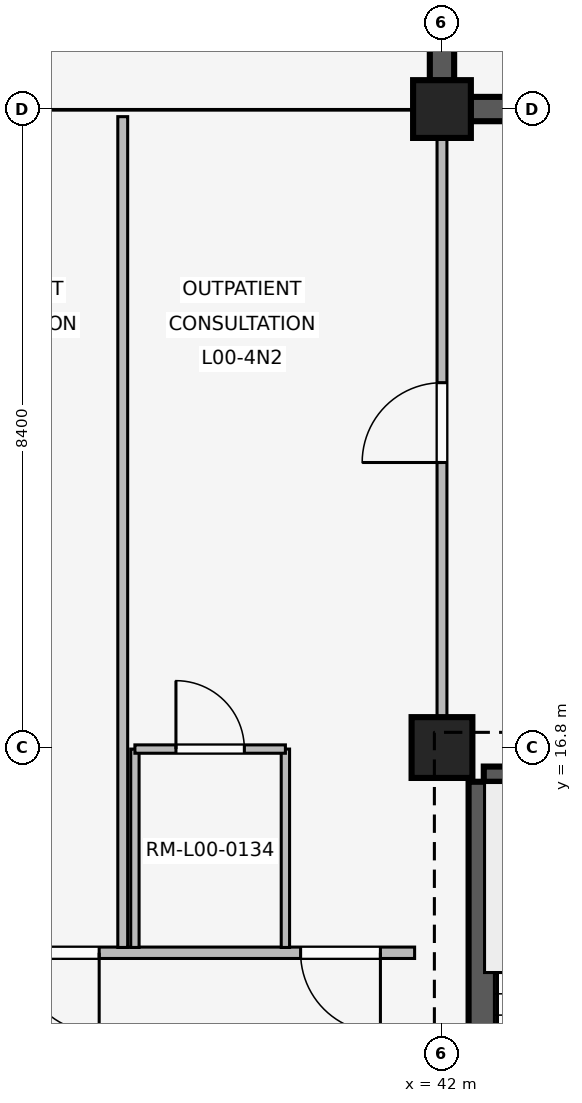
"""IFC4 building model, lengths in metres.
Left out: names, types, materials, properties, quantities, classifications, styles, units other than length and angle.
Written with IfcOpenShell. Run it as: python <this file> out.ifc"""

import sys

from ifc_helpers import new_model, si_unit, direction, frame, frame_2d, origin, origin_2d, place, context, subcontext, project, spatial, rectangle, extrude, element, fill, save


model = new_model("IFC4")
c1 = context("Model", 3, precision=1e-05, world=origin(), true_north=direction((0.0, 1.0)))
c2 = subcontext(c1, "Body", "Model", "MODEL_VIEW")
j1 = project(units=[si_unit("LENGTHUNIT", "METRE"), si_unit("PLANEANGLEUNIT", "RADIAN")], contexts=[c1])
p1 = place(None, origin())
s1 = spatial("IfcSite", under=j1, at=p1, CompositionType="ELEMENT")
p2 = place(p1, origin())
s2 = spatial("IfcBuilding", under=s1, at=p2, CompositionType="ELEMENT")
p3 = place(p2, origin())
s3 = spatial("IfcBuildingStorey", under=s2, at=p3, CompositionType="ELEMENT", Elevation=0.0)
p4 = place(p3, frame((42.0, 16.8, 0.0), z_axis=(0.0, 0.0, 1.0), x_axis=(1.0, 0.0, 0.0)))
e1 = element("IfcColumn", 1, at=p4, inside=s3, PredefinedType="COLUMN", context=c2, shape_type="SweptSolid", body=[
    extrude(rectangle(XDim=0.8, YDim=0.8, at=origin_2d()), origin(), (0.0, 0.0, 1.0), 4.8),
])
p5 = place(p3, frame((42.0, 25.2, 0.0), z_axis=(0.0, 0.0, 1.0), x_axis=(1.0, 0.0, 0.0)))
e2 = element("IfcColumn", 2, at=p5, inside=s3, PredefinedType="COLUMN", context=c2, shape_type="SweptSolid", body=[
    extrude(rectangle(XDim=0.76, YDim=0.76, at=origin_2d()), origin(), (0.0, 0.0, 1.0), 4.8),
])
p6 = place(p3, frame((42.0, 33.225, 0.0), z_axis=(0.0, 0.0, 1.0), x_axis=(0.0, -1.0, 0.0)))
e3 = element("IfcWall", 3, at=p6, inside=s3, PredefinedType="SOLIDWALL", context=c2, shape_type="SweptSolid", body=[
    extrude(rectangle(XDim=7.65, YDim=0.32, at=frame_2d((3.825, 0.0))), origin(), (0.0, 0.0, 1.0), 3.82),
])
p7 = place(p6, frame((0.969, 0.0, 0.85)))
e4 = element("IfcOpeningElement", 4, at=p7, cuts=e3, PredefinedType="OPENING", context=c2, shape_type="SweptSolid", body=[
    extrude(rectangle(XDim=1.58, YDim=1.7, at=frame_2d((0.79, 0.85))), frame((0.0, 0.17, 0.0), z_axis=(0.0, -1.0, 0.0), x_axis=(1.0, 0.0, 0.0)), (0.0, 0.0, 1.0), 0.34),
])
p8 = place(p6, frame((5.101, 0.0, 0.85)))
e5 = element("IfcOpeningElement", 5, at=p8, cuts=e3, PredefinedType="OPENING", context=c2, shape_type="SweptSolid", body=[
    extrude(rectangle(XDim=1.58, YDim=1.7, at=frame_2d((0.79, 0.85))), frame((0.0, 0.17, 0.0), z_axis=(0.0, -1.0, 0.0), x_axis=(1.0, 0.0, 0.0)), (0.0, 0.0, 1.0), 0.34),
])
p9 = place(p3, frame((42.375, 25.2, 0.0), z_axis=(0.0, 0.0, 1.0), x_axis=(1.0, 0.0, 0.0)))
e6 = element("IfcWall", 6, at=p9, inside=s3, PredefinedType="SOLIDWALL", context=c2, shape_type="SweptSolid", body=[
    extrude(rectangle(XDim=7.65, YDim=0.32, at=frame_2d((3.825, 0.0))), origin(), (0.0, 0.0, 1.0), 3.82),
])
p10 = place(p9, frame((1.209, 0.0, 0.85)))
e7 = element("IfcOpeningElement", 7, at=p10, cuts=e6, PredefinedType="OPENING", context=c2, shape_type="SweptSolid", body=[
    extrude(rectangle(XDim=1.1, YDim=1.6, at=frame_2d((0.55, 0.8))), frame((0.0, 0.17, 0.0), z_axis=(0.0, -1.0, 0.0), x_axis=(1.0, 0.0, 0.0)), (0.0, 0.0, 1.0), 0.34),
])
p11 = place(p9, frame((5.341, 0.0, 0.85)))
e8 = element("IfcOpeningElement", 8, at=p11, cuts=e6, PredefinedType="OPENING", context=c2, shape_type="SweptSolid", body=[
    extrude(rectangle(XDim=1.1, YDim=1.6, at=frame_2d((0.55, 0.8))), frame((0.0, 0.17, 0.0), z_axis=(0.0, -1.0, 0.0), x_axis=(1.0, 0.0, 0.0)), (0.0, 0.0, 1.0), 0.34),
])
p12 = place(p3, frame((42.55, 16.35, 0.0), z_axis=(0.0, 0.0, 1.0), x_axis=(1.0, 0.0, 0.0)))
e9 = element("IfcWall", 9, at=p12, inside=s3, PredefinedType="SHEAR", context=c2, shape_type="SweptSolid", body=[
    extrude(rectangle(XDim=7.5, YDim=0.4, at=frame_2d((3.75, 0.0))), origin(), (0.0, 0.0, 1.0), 4.52),
])
p13 = place(p3, frame((42.55, 8.8, 0.0), z_axis=(0.0, 0.0, 1.0), x_axis=(0.0, 1.0, 0.0)))
e10 = element("IfcWall", 10, at=p13, inside=s3, PredefinedType="SHEAR", context=c2, shape_type="SweptSolid", body=[
    extrude(rectangle(XDim=7.55, YDim=0.4, at=frame_2d((3.775, 0.0))), origin(), (0.0, 0.0, 1.0), 4.52),
])
p14 = place(p13, frame((0.28, 0.0, 0.0)))
e11 = element("IfcOpeningElement", 11, at=p14, cuts=e10, PredefinedType="OPENING", context=c2, shape_type="SweptSolid", body=[
    extrude(rectangle(XDim=1.0, YDim=2.15, at=frame_2d((0.5, 1.075))), frame((0.0, 0.21, 0.0), z_axis=(0.0, -1.0, 0.0), x_axis=(1.0, 0.0, 0.0)), (0.0, 0.0, 1.0), 0.42),
])
p15 = place(p3, frame((41.64, 14.1, 0.0), z_axis=(0.0, 0.0, 1.0), x_axis=(-1.0, 0.0, 0.0)))
e12 = element("IfcWall", 12, at=p15, inside=s3, PredefinedType="PARTITIONING", context=c2, shape_type="SweptSolid", body=[
    extrude(rectangle(XDim=7.96, YDim=0.15, at=frame_2d((3.98, 0.0))), origin(), (0.0, 0.0, 1.0), 3.8),
])
p16 = place(p15, frame((0.45, 0.0, 0.0)))
e13 = element("IfcOpeningElement", 13, at=p16, cuts=e12, PredefinedType="OPENING", context=c2, shape_type="SweptSolid", body=[
    extrude(rectangle(XDim=1.05, YDim=2.2, at=frame_2d((0.525, 1.1))), frame((0.0, 0.085, 0.0), z_axis=(0.0, -1.0, 0.0), x_axis=(1.0, 0.0, 0.0)), (0.0, 0.0, 1.0), 0.17),
])
p17 = place(p15, frame((4.15, 0.0, 0.0)))
e14 = element("IfcOpeningElement", 14, at=p17, cuts=e12, PredefinedType="OPENING", context=c2, shape_type="SweptSolid", body=[
    extrude(rectangle(XDim=1.05, YDim=2.2, at=frame_2d((0.525, 1.1))), frame((0.0, 0.085, 0.0), z_axis=(0.0, -1.0, 0.0), x_axis=(1.0, 0.0, 0.0)), (0.0, 0.0, 1.0), 0.17),
])
p18 = place(p3, frame((37.8, 14.17, 0.0), z_axis=(0.0, 0.0, 1.0), x_axis=(0.0, 1.0, 0.0)))
e15 = element("IfcWall", 15, at=p18, inside=s3, PredefinedType="PARTITIONING", context=c2, shape_type="SweptSolid", body=[
    extrude(rectangle(XDim=10.93, YDim=0.13, at=frame_2d((5.465, 0.0))), origin(), (0.0, 0.0, 1.0), 3.8),
])
for number, where, z_axis, x_axis in (
    (16, (37.96, 14.17, 0.0), (0.0, 0.0, 1.0), (0.0, 1.0, 0.0)),
    (17, (39.94, 14.17, 0.0), (0.0, 0.0, 1.0), (0.0, 1.0, 0.0)),
):
    element("IfcWall", number, at=place(p3, frame(where, z_axis=z_axis, x_axis=x_axis)), inside=s3, PredefinedType="PARTITIONING", context=c2, shape_type="SweptSolid", body=[
        extrude(rectangle(XDim=2.61, YDim=0.11, at=frame_2d((1.305, 0.0))), origin(), (0.0, 0.0, 1.0), 3.8),
    ])
p19 = place(p3, frame((37.96, 16.78, 0.0), z_axis=(0.0, 0.0, 1.0), x_axis=(1.0, 0.0, 0.0)))
e18 = element("IfcWall", 18, at=p19, inside=s3, PredefinedType="PARTITIONING", context=c2, shape_type="SweptSolid", body=[
    extrude(rectangle(XDim=1.98, YDim=0.11, at=frame_2d((0.99, 0.0))), origin(), (0.0, 0.0, 1.0), 3.8),
])
p20 = place(p19, frame((0.54, 0.0, 0.0)))
e19 = element("IfcOpeningElement", 19, at=p20, cuts=e18, PredefinedType="OPENING", context=c2, shape_type="SweptSolid", body=[
    extrude(rectangle(XDim=0.9, YDim=2.1, at=frame_2d((0.45, 1.05))), frame((0.0, 0.065, 0.0), z_axis=(0.0, -1.0, 0.0), x_axis=(1.0, 0.0, 0.0)), (0.0, 0.0, 1.0), 0.13),
])
p21 = place(p3, frame((42.0, 17.15, 0.0), z_axis=(0.0, 0.0, 1.0), x_axis=(0.0, 1.0, 0.0)))
e20 = element("IfcWall", 20, at=p21, inside=s3, PredefinedType="PARTITIONING", context=c2, shape_type="SweptSolid", body=[
    extrude(rectangle(XDim=7.91, YDim=0.13, at=frame_2d((3.955, 0.0))), origin(), (0.0, 0.0, 1.0), 3.8),
])
p22 = place(p21, frame((3.4, 0.0, 0.0)))
e21 = element("IfcOpeningElement", 21, at=p22, cuts=e20, PredefinedType="OPENING", context=c2, shape_type="SweptSolid", body=[
    extrude(rectangle(XDim=1.05, YDim=2.2, at=frame_2d((0.525, 1.1))), frame((0.0, 0.075, 0.0), z_axis=(0.0, -1.0, 0.0), x_axis=(1.0, 0.0, 0.0)), (0.0, 0.0, 1.0), 0.15),
])
p23 = place(p16, origin())
e22 = element("IfcDoor", 22, at=p23, inside=s3, OperationType="SINGLE_SWING_LEFT", PredefinedType="DOOR", context=c2, shape_type="SweptSolid", body=[
    extrude(rectangle(XDim=1.05, YDim=2.2, at=frame_2d((0.525, 1.1))), frame((0.0, 0.025, 0.0), z_axis=(0.0, -1.0, 0.0), x_axis=(1.0, 0.0, 0.0)), (0.0, 0.0, 1.0), 0.05),
])
fill(e13, e22)
p24 = place(p17, origin())
e23 = element("IfcDoor", 23, at=p24, inside=s3, OperationType="SINGLE_SWING_LEFT", PredefinedType="DOOR", context=c2, shape_type="SweptSolid", body=[
    extrude(rectangle(XDim=1.05, YDim=2.2, at=frame_2d((0.525, 1.1))), frame((0.0, 0.025, 0.0), z_axis=(0.0, -1.0, 0.0), x_axis=(1.0, 0.0, 0.0)), (0.0, 0.0, 1.0), 0.05),
])
fill(e14, e23)
p25 = place(p20, origin())
e24 = element("IfcDoor", 24, at=p25, inside=s3, OperationType="SINGLE_SWING_LEFT", PredefinedType="DOOR", context=c2, shape_type="SweptSolid", body=[
    extrude(rectangle(XDim=0.9, YDim=2.1, at=frame_2d((0.45, 1.05))), frame((0.0, 0.025, 0.0), z_axis=(0.0, -1.0, 0.0), x_axis=(1.0, 0.0, 0.0)), (0.0, 0.0, 1.0), 0.05),
])
fill(e19, e24)
p26 = place(p22, origin())
e25 = element("IfcDoor", 25, at=p26, inside=s3, OperationType="SINGLE_SWING_LEFT", PredefinedType="DOOR", context=c2, shape_type="SweptSolid", body=[
    extrude(rectangle(XDim=1.05, YDim=2.2, at=frame_2d((0.525, 1.1))), frame((0.0, 0.025, 0.0), z_axis=(0.0, -1.0, 0.0), x_axis=(1.0, 0.0, 0.0)), (0.0, 0.0, 1.0), 0.05),
])
fill(e21, e25)
save(model, sys.argv[1])
